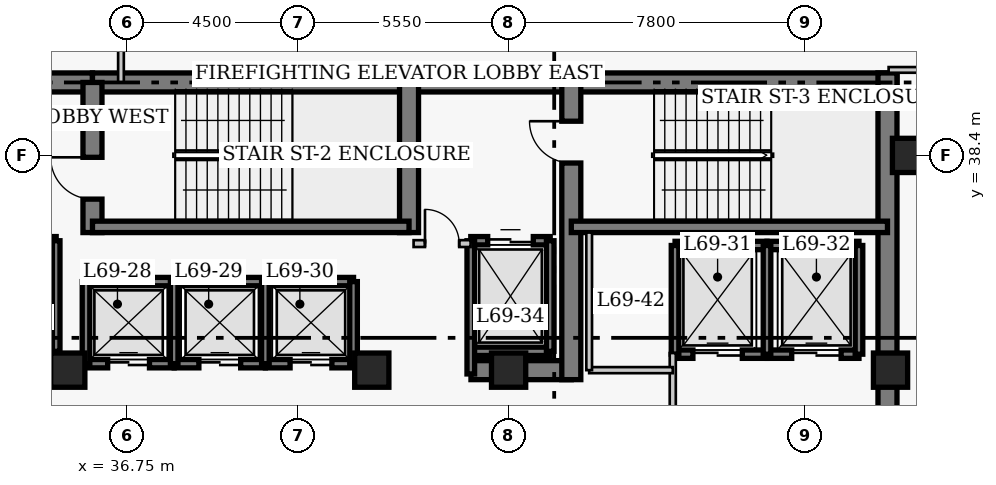
"""IFC4 building model, lengths in metres.
Left out: names, types, materials, properties, quantities, classifications, styles, units other than length and angle.
Written with IfcOpenShell. Run it as: python <this file> out.ifc"""

import sys

from ifc_helpers import new_model, si_unit, direction, frame, frame_2d, origin, origin_2d, place, context, subcontext, project, spatial, rectangle, extrude, element, fill, save


model = new_model("IFC4")
c1 = context("Model", 3, precision=1e-05, world=origin(), true_north=direction((0.0, 1.0)))
c2 = subcontext(c1, "Body", "Model", "MODEL_VIEW")
j1 = project(units=[si_unit("LENGTHUNIT", "METRE"), si_unit("PLANEANGLEUNIT", "RADIAN")], contexts=[c1])
p1 = place(None, origin())
s1 = spatial("IfcSite", under=j1, at=p1, CompositionType="ELEMENT")
p2 = place(p1, origin())
s2 = spatial("IfcBuilding", under=s1, at=p2, CompositionType="ELEMENT")
p3 = place(p2, frame((0.0, 0.0, 277.4)))
s3 = spatial("IfcBuildingStorey", under=s2, at=p3, CompositionType="ELEMENT", Elevation=277.4)
p4 = place(p3, frame((21.65, 40.32, 0.0), z_axis=(0.0, 0.0, 1.0), x_axis=(1.0, 0.0, 0.0)))
e1 = element("IfcWall", 1, at=p4, inside=s3, PredefinedType="SHEAR", context=c2, shape_type="SweptSolid", body=[
    extrude(rectangle(XDim=14.2, YDim=0.5, at=frame_2d((7.1, 0.0))), origin(), (0.0, 0.0, 1.0), 4.0),
])
p5 = place(p3, frame((35.85, 40.32, 0.0), z_axis=(0.0, 0.0, 1.0), x_axis=(1.0, 0.0, 0.0)))
e2 = element("IfcWall", 2, at=p5, inside=s3, PredefinedType="SHEAR", context=c2, shape_type="SweptSolid", body=[
    extrude(rectangle(XDim=12.6, YDim=0.5, at=frame_2d((6.3, 0.0))), origin(), (0.0, 0.0, 1.0), 4.0),
])
p6 = place(p3, frame((48.45, 40.32, 0.0), z_axis=(0.0, 0.0, 1.0), x_axis=(1.0, 0.0, 0.0)))
e3 = element("IfcWall", 3, at=p6, inside=s3, PredefinedType="SHEAR", context=c2, shape_type="SweptSolid", body=[
    extrude(rectangle(XDim=8.57, YDim=0.5, at=frame_2d((4.285, 0.0))), origin(), (0.0, 0.0, 1.0), 4.0),
])
p7 = place(p3, frame((56.77, 27.05, 0.0), z_axis=(0.0, 0.0, 1.0), x_axis=(0.0, 1.0, 0.0)))
e4 = element("IfcWall", 4, at=p7, inside=s3, PredefinedType="SHEAR", context=c2, shape_type="SweptSolid", body=[
    extrude(rectangle(XDim=13.52, YDim=0.5, at=frame_2d((6.76, 0.0))), origin(), (0.0, 0.0, 1.0), 4.0),
])
p8 = place(p3, frame((45.81, 32.75, 0.0), z_axis=(0.0, 0.0, 1.0), x_axis=(1.0, 0.0, 0.0)))
e5 = element("IfcWall", 5, at=p8, inside=s3, PredefinedType="SHEAR", context=c2, shape_type="SweptSolid", body=[
    extrude(rectangle(XDim=2.64, YDim=0.5, at=frame_2d((1.32, 0.0))), origin(), (0.0, 0.0, 1.0), 4.0),
])
p9 = place(p3, frame((35.85, 36.37, 0.0), z_axis=(0.0, 0.0, 1.0), x_axis=(0.0, 1.0, 0.0)))
e6 = element("IfcWall", 6, at=p9, inside=s3, PredefinedType="SHEAR", context=c2, shape_type="SweptSolid", body=[
    extrude(rectangle(XDim=3.95, YDim=0.5, at=frame_2d((1.975, 0.0))), origin(), (0.0, 0.0, 1.0), 4.0),
])
p10 = place(p9, frame((0.88, 0.0, 0.0)))
e7 = element("IfcOpeningElement", 7, at=p10, cuts=e6, PredefinedType="OPENING", context=c2, shape_type="SweptSolid", body=[
    extrude(rectangle(XDim=1.1, YDim=2.15, at=frame_2d((0.55, 1.075))), frame((0.0, 0.26, 0.0), z_axis=(0.0, -1.0, 0.0), x_axis=(1.0, 0.0, 0.0)), (0.0, 0.0, 1.0), 0.52),
])
p11 = place(p3, frame((44.18, 36.37, 0.0), z_axis=(0.0, 0.0, 1.0), x_axis=(0.0, 1.0, 0.0)))
e8 = element("IfcWall", 8, at=p11, inside=s3, PredefinedType="SHEAR", context=c2, shape_type="SweptSolid", body=[
    extrude(rectangle(XDim=3.95, YDim=0.5, at=frame_2d((1.975, 0.0))), origin(), (0.0, 0.0, 1.0), 4.0),
])
p12 = place(p3, frame((48.45, 32.5, 0.0), z_axis=(0.0, 0.0, 1.0), x_axis=(0.0, 1.0, 0.0)))
e9 = element("IfcWall", 9, at=p12, inside=s3, PredefinedType="SHEAR", context=c2, shape_type="SweptSolid", body=[
    extrude(rectangle(XDim=7.82, YDim=0.5, at=frame_2d((3.91, 0.0))), origin(), (0.0, 0.0, 1.0), 4.0),
])
p13 = place(p12, frame((5.7, 0.0, 0.0)))
e10 = element("IfcOpeningElement", 10, at=p13, cuts=e9, PredefinedType="OPENING", context=c2, shape_type="SweptSolid", body=[
    extrude(rectangle(XDim=1.1, YDim=2.15, at=frame_2d((0.55, 1.075))), frame((0.0, 0.26, 0.0), z_axis=(0.0, -1.0, 0.0), x_axis=(1.0, 0.0, 0.0)), (0.0, 0.0, 1.0), 0.52),
])
p14 = place(p3, frame((35.85, 36.52, 0.0), z_axis=(0.0, 0.0, 1.0), x_axis=(1.0, 0.0, 0.0)))
e11 = element("IfcWall", 11, at=p14, inside=s3, PredefinedType="SHEAR", context=c2, shape_type="SweptSolid", body=[
    extrude(rectangle(XDim=8.33, YDim=0.3, at=frame_2d((4.165, 0.0))), origin(), (0.0, 0.0, 1.0), 4.0),
])
p15 = place(p3, frame((48.45, 36.52, 0.0), z_axis=(0.0, 0.0, 1.0), x_axis=(1.0, 0.0, 0.0)))
e12 = element("IfcWall", 12, at=p15, inside=s3, PredefinedType="SHEAR", context=c2, shape_type="SweptSolid", body=[
    extrude(rectangle(XDim=8.32, YDim=0.3, at=frame_2d((4.16, 0.0))), origin(), (0.0, 0.0, 1.0), 4.0),
])
for number, where, z_axis, x_axis in (
    (13, (57.35, 38.4, 0.0), (0.0, 0.0, 1.0), (1.0, 0.0, 0.0)),
    (14, (35.2, 32.75, 0.0), (0.0, 0.0, 1.0), (1.0, 0.0, 0.0)),
    (15, (43.2, 32.75, 0.0), (0.0, 0.0, 1.0), (1.0, 0.0, 0.0)),
    (16, (46.8, 32.75, 0.0), (0.0, 0.0, 1.0), (1.0, 0.0, 0.0)),
    (17, (56.85, 32.75, 0.0), (0.0, 0.0, 1.0), (1.0, 0.0, 0.0)),
):
    element("IfcColumn", number, at=place(p3, frame(where, z_axis=z_axis, x_axis=x_axis)), inside=s3, PredefinedType="COLUMN", context=c2, shape_type="SweptSolid", body=[
        extrude(rectangle(XDim=0.9, YDim=0.9, at=origin_2d()), origin(), (0.0, 0.0, 1.0), 4.0),
    ])
p16 = place(p3, frame((35.68, 35.08, 0.0), z_axis=(0.0, 0.0, 1.0), x_axis=(1.0, 0.0, 0.0)))
e18 = element("IfcWall", 18, at=p16, inside=s3, PredefinedType="SHEAR", context=c2, shape_type="SweptSolid", body=[
    extrude(rectangle(XDim=2.32, YDim=0.22, at=frame_2d((1.16, 0.0))), origin(), (0.0, 0.0, 1.0), 4.0),
])
p17 = place(p3, frame((35.68, 32.92, 0.0), z_axis=(0.0, 0.0, 1.0), x_axis=(1.0, 0.0, 0.0)))
e19 = element("IfcWall", 19, at=p17, inside=s3, PredefinedType="SHEAR", context=c2, shape_type="SweptSolid", body=[
    extrude(rectangle(XDim=2.32, YDim=0.22, at=frame_2d((1.16, 0.0))), origin(), (0.0, 0.0, 1.0), 4.0),
])
p18 = place(p17, frame((0.57, 0.0, 0.0)))
e20 = element("IfcOpeningElement", 20, at=p18, cuts=e19, PredefinedType="OPENING", context=c2, shape_type="SweptSolid", body=[
    extrude(rectangle(XDim=1.1, YDim=2.15, at=frame_2d((0.55, 1.075))), frame((0.0, 0.12, 0.0), z_axis=(0.0, -1.0, 0.0), x_axis=(1.0, 0.0, 0.0)), (0.0, 0.0, 1.0), 0.24),
])
p19 = place(p3, frame((35.68, 32.92, 0.0), z_axis=(0.0, 0.0, 1.0), x_axis=(0.0, 1.0, 0.0)))
e21 = element("IfcWall", 21, at=p19, inside=s3, PredefinedType="SHEAR", context=c2, shape_type="SweptSolid", body=[
    extrude(rectangle(XDim=2.16, YDim=0.2, at=frame_2d((1.08, 0.0))), origin(), (0.0, 0.0, 1.0), 4.0),
])
p20 = place(p3, frame((38.0, 35.08, 0.0), z_axis=(0.0, 0.0, 1.0), x_axis=(1.0, 0.0, 0.0)))
e22 = element("IfcWall", 22, at=p20, inside=s3, PredefinedType="SHEAR", context=c2, shape_type="SweptSolid", body=[
    extrude(rectangle(XDim=2.4, YDim=0.22, at=frame_2d((1.2, 0.0))), origin(), (0.0, 0.0, 1.0), 4.0),
])
p21 = place(p3, frame((38.0, 32.92, 0.0), z_axis=(0.0, 0.0, 1.0), x_axis=(1.0, 0.0, 0.0)))
e23 = element("IfcWall", 23, at=p21, inside=s3, PredefinedType="SHEAR", context=c2, shape_type="SweptSolid", body=[
    extrude(rectangle(XDim=2.4, YDim=0.22, at=frame_2d((1.2, 0.0))), origin(), (0.0, 0.0, 1.0), 4.0),
])
p22 = place(p21, frame((0.65, 0.0, 0.0)))
e24 = element("IfcOpeningElement", 24, at=p22, cuts=e23, PredefinedType="OPENING", context=c2, shape_type="SweptSolid", body=[
    extrude(rectangle(XDim=1.1, YDim=2.15, at=frame_2d((0.55, 1.075))), frame((0.0, 0.12, 0.0), z_axis=(0.0, -1.0, 0.0), x_axis=(1.0, 0.0, 0.0)), (0.0, 0.0, 1.0), 0.24),
])
p23 = place(p3, frame((38.0, 32.92, 0.0), z_axis=(0.0, 0.0, 1.0), x_axis=(0.0, 1.0, 0.0)))
e25 = element("IfcWall", 25, at=p23, inside=s3, PredefinedType="SHEAR", context=c2, shape_type="SweptSolid", body=[
    extrude(rectangle(XDim=2.16, YDim=0.2, at=frame_2d((1.08, 0.0))), origin(), (0.0, 0.0, 1.0), 4.0),
])
p24 = place(p3, frame((40.4, 35.08, 0.0), z_axis=(0.0, 0.0, 1.0), x_axis=(1.0, 0.0, 0.0)))
e26 = element("IfcWall", 26, at=p24, inside=s3, PredefinedType="SHEAR", context=c2, shape_type="SweptSolid", body=[
    extrude(rectangle(XDim=2.32, YDim=0.22, at=frame_2d((1.16, 0.0))), origin(), (0.0, 0.0, 1.0), 4.0),
])
p25 = place(p3, frame((40.4, 32.92, 0.0), z_axis=(0.0, 0.0, 1.0), x_axis=(1.0, 0.0, 0.0)))
e27 = element("IfcWall", 27, at=p25, inside=s3, PredefinedType="SHEAR", context=c2, shape_type="SweptSolid", body=[
    extrude(rectangle(XDim=2.32, YDim=0.22, at=frame_2d((1.16, 0.0))), origin(), (0.0, 0.0, 1.0), 4.0),
])
p26 = place(p25, frame((0.65, 0.0, 0.0)))
e28 = element("IfcOpeningElement", 28, at=p26, cuts=e27, PredefinedType="OPENING", context=c2, shape_type="SweptSolid", body=[
    extrude(rectangle(XDim=1.1, YDim=2.15, at=frame_2d((0.55, 1.075))), frame((0.0, 0.12, 0.0), z_axis=(0.0, -1.0, 0.0), x_axis=(1.0, 0.0, 0.0)), (0.0, 0.0, 1.0), 0.24),
])
for number, where, z_axis, x_axis in (
    (29, (40.4, 32.92, 0.0), (0.0, 0.0, 1.0), (0.0, 1.0, 0.0)),
    (30, (42.72, 32.92, 0.0), (0.0, 0.0, 1.0), (0.0, 1.0, 0.0)),
):
    element("IfcWall", number, at=place(p3, frame(where, z_axis=z_axis, x_axis=x_axis)), inside=s3, PredefinedType="SHEAR", context=c2, shape_type="SweptSolid", body=[
        extrude(rectangle(XDim=2.16, YDim=0.2, at=frame_2d((1.08, 0.0))), origin(), (0.0, 0.0, 1.0), 4.0),
    ])
p27 = place(p3, frame((51.18, 36.03, 0.0), z_axis=(0.0, 0.0, 1.0), x_axis=(1.0, 0.0, 0.0)))
e31 = element("IfcWall", 31, at=p27, inside=s3, PredefinedType="SHEAR", context=c2, shape_type="SweptSolid", body=[
    extrude(rectangle(XDim=2.42, YDim=0.22, at=frame_2d((1.21, 0.0))), origin(), (0.0, 0.0, 1.0), 4.0),
])
p28 = place(p3, frame((51.18, 33.17, 0.0), z_axis=(0.0, 0.0, 1.0), x_axis=(1.0, 0.0, 0.0)))
e32 = element("IfcWall", 32, at=p28, inside=s3, PredefinedType="SHEAR", context=c2, shape_type="SweptSolid", body=[
    extrude(rectangle(XDim=2.42, YDim=0.22, at=frame_2d((1.21, 0.0))), origin(), (0.0, 0.0, 1.0), 4.0),
])
p29 = place(p28, frame((0.47, 0.0, 0.0)))
e33 = element("IfcOpeningElement", 33, at=p29, cuts=e32, PredefinedType="OPENING", context=c2, shape_type="SweptSolid", body=[
    extrude(rectangle(XDim=1.3, YDim=2.15, at=frame_2d((0.65, 1.075))), frame((0.0, 0.12, 0.0), z_axis=(0.0, -1.0, 0.0), x_axis=(1.0, 0.0, 0.0)), (0.0, 0.0, 1.0), 0.24),
])
p30 = place(p3, frame((51.18, 33.17, 0.0), z_axis=(0.0, 0.0, 1.0), x_axis=(0.0, 1.0, 0.0)))
e34 = element("IfcWall", 34, at=p30, inside=s3, PredefinedType="SHEAR", context=c2, shape_type="SweptSolid", body=[
    extrude(rectangle(XDim=2.86, YDim=0.2, at=frame_2d((1.43, 0.0))), origin(), (0.0, 0.0, 1.0), 4.0),
])
p31 = place(p3, frame((53.6, 36.03, 0.0), z_axis=(0.0, 0.0, 1.0), x_axis=(1.0, 0.0, 0.0)))
e35 = element("IfcWall", 35, at=p31, inside=s3, PredefinedType="SHEAR", context=c2, shape_type="SweptSolid", body=[
    extrude(rectangle(XDim=2.42, YDim=0.22, at=frame_2d((1.21, 0.0))), origin(), (0.0, 0.0, 1.0), 4.0),
])
p32 = place(p3, frame((53.6, 33.17, 0.0), z_axis=(0.0, 0.0, 1.0), x_axis=(1.0, 0.0, 0.0)))
e36 = element("IfcWall", 36, at=p32, inside=s3, PredefinedType="SHEAR", context=c2, shape_type="SweptSolid", body=[
    extrude(rectangle(XDim=2.42, YDim=0.22, at=frame_2d((1.21, 0.0))), origin(), (0.0, 0.0, 1.0), 4.0),
])
p33 = place(p32, frame((0.65, 0.0, 0.0)))
e37 = element("IfcOpeningElement", 37, at=p33, cuts=e36, PredefinedType="OPENING", context=c2, shape_type="SweptSolid", body=[
    extrude(rectangle(XDim=1.3, YDim=2.15, at=frame_2d((0.65, 1.075))), frame((0.0, 0.12, 0.0), z_axis=(0.0, -1.0, 0.0), x_axis=(1.0, 0.0, 0.0)), (0.0, 0.0, 1.0), 0.24),
])
for number, where, z_axis, x_axis in (
    (38, (53.6, 33.17, 0.0), (0.0, 0.0, 1.0), (0.0, 1.0, 0.0)),
    (39, (56.02, 33.17, 0.0), (0.0, 0.0, 1.0), (0.0, 1.0, 0.0)),
):
    element("IfcWall", number, at=place(p3, frame(where, z_axis=z_axis, x_axis=x_axis)), inside=s3, PredefinedType="SHEAR", context=c2, shape_type="SweptSolid", body=[
        extrude(rectangle(XDim=2.86, YDim=0.2, at=frame_2d((1.43, 0.0))), origin(), (0.0, 0.0, 1.0), 4.0),
    ])
p34 = place(p3, frame((32.805, 36.155, 0.0), z_axis=(0.0, 0.0, 1.0), x_axis=(1.0, 0.0, 0.0)))
e40 = element("IfcWall", 40, at=p34, inside=s3, PredefinedType="SHEAR", context=c2, shape_type="SweptSolid", body=[
    extrude(rectangle(XDim=2.09, YDim=0.22, at=frame_2d((1.045, 0.0))), origin(), (0.0, 0.0, 1.0), 4.0),
])
p35 = place(p34, frame((0.445, 0.0, 0.0)))
e41 = element("IfcOpeningElement", 41, at=p35, cuts=e40, PredefinedType="OPENING", context=c2, shape_type="SweptSolid", body=[
    extrude(rectangle(XDim=1.2, YDim=2.15, at=frame_2d((0.6, 1.075))), frame((0.0, 0.12, 0.0), z_axis=(0.0, -1.0, 0.0), x_axis=(1.0, 0.0, 0.0)), (0.0, 0.0, 1.0), 0.24),
])
p36 = place(p3, frame((32.805, 33.245, 0.0), z_axis=(0.0, 0.0, 1.0), x_axis=(1.0, 0.0, 0.0)))
e42 = element("IfcWall", 42, at=p36, inside=s3, PredefinedType="SHEAR", context=c2, shape_type="SweptSolid", body=[
    extrude(rectangle(XDim=2.09, YDim=0.22, at=frame_2d((1.045, 0.0))), origin(), (0.0, 0.0, 1.0), 4.0),
])
p37 = place(p3, frame((34.895, 33.245, 0.0), z_axis=(0.0, 0.0, 1.0), x_axis=(0.0, 1.0, 0.0)))
e43 = element("IfcWall", 43, at=p37, inside=s3, PredefinedType="SHEAR", context=c2, shape_type="SweptSolid", body=[
    extrude(rectangle(XDim=2.91, YDim=0.2, at=frame_2d((1.455, 0.0))), origin(), (0.0, 0.0, 1.0), 4.0),
])
p38 = place(p3, frame((45.805, 36.155, 0.0), z_axis=(0.0, 0.0, 1.0), x_axis=(1.0, 0.0, 0.0)))
e44 = element("IfcWall", 44, at=p38, inside=s3, PredefinedType="SHEAR", context=c2, shape_type="SweptSolid", body=[
    extrude(rectangle(XDim=2.09, YDim=0.22, at=frame_2d((1.045, 0.0))), origin(), (0.0, 0.0, 1.0), 4.0),
])
p39 = place(p38, frame((0.445, 0.0, 0.0)))
e45 = element("IfcOpeningElement", 45, at=p39, cuts=e44, PredefinedType="OPENING", context=c2, shape_type="SweptSolid", body=[
    extrude(rectangle(XDim=1.2, YDim=2.15, at=frame_2d((0.6, 1.075))), frame((0.0, 0.12, 0.0), z_axis=(0.0, -1.0, 0.0), x_axis=(1.0, 0.0, 0.0)), (0.0, 0.0, 1.0), 0.24),
])
p40 = place(p3, frame((45.805, 33.245, 0.0), z_axis=(0.0, 0.0, 1.0), x_axis=(1.0, 0.0, 0.0)))
e46 = element("IfcWall", 46, at=p40, inside=s3, PredefinedType="SHEAR", context=c2, shape_type="SweptSolid", body=[
    extrude(rectangle(XDim=2.09, YDim=0.22, at=frame_2d((1.045, 0.0))), origin(), (0.0, 0.0, 1.0), 4.0),
])
p41 = place(p3, frame((45.805, 32.65, 0.0), z_axis=(0.0, 0.0, 1.0), x_axis=(0.0, 1.0, 0.0)))
e47 = element("IfcWall", 47, at=p41, inside=s3, PredefinedType="SHEAR", context=c2, shape_type="SweptSolid", body=[
    extrude(rectangle(XDim=3.505, YDim=0.2, at=frame_2d((1.752, 0.0))), origin(), (0.0, 0.0, 1.0), 4.0),
])
p42 = place(p3, frame((47.895, 33.245, 0.0), z_axis=(0.0, 0.0, 1.0), x_axis=(0.0, 1.0, 0.0)))
e48 = element("IfcWall", 48, at=p42, inside=s3, PredefinedType="SHEAR", context=c2, shape_type="SweptSolid", body=[
    extrude(rectangle(XDim=2.91, YDim=0.2, at=frame_2d((1.455, 0.0))), origin(), (0.0, 0.0, 1.0), 4.0),
])
p43 = place(p3, frame((44.3, 36.08, 0.0), z_axis=(0.0, 0.0, 1.0), x_axis=(1.0, 0.0, 0.0)))
e49 = element("IfcWall", 49, at=p43, inside=s3, PredefinedType="PARTITIONING", context=c2, shape_type="SweptSolid", body=[
    extrude(rectangle(XDim=1.5, YDim=0.18, at=frame_2d((0.75, 0.0))), origin(), (0.0, 0.0, 1.0), 3.76),
])
p44 = place(p43, frame((0.3, 0.0, 0.0)))
e50 = element("IfcOpeningElement", 50, at=p44, cuts=e49, PredefinedType="OPENING", context=c2, shape_type="SweptSolid", body=[
    extrude(rectangle(XDim=0.9, YDim=2.15, at=frame_2d((0.45, 1.075))), frame((0.0, 0.1, 0.0), z_axis=(0.0, -1.0, 0.0), x_axis=(1.0, 0.0, 0.0)), (0.0, 0.0, 1.0), 0.2),
])
p45 = place(p3, frame((51.12, 29.5, 0.0), z_axis=(0.0, 0.0, 1.0), x_axis=(0.0, 1.0, 0.0)))
e51 = element("IfcWall", 51, at=p45, inside=s3, PredefinedType="PARTITIONING", context=c2, shape_type="SweptSolid", body=[
    extrude(rectangle(XDim=3.7, YDim=0.16, at=frame_2d((1.85, 0.0))), origin(), (0.0, 0.0, 1.0), 3.76),
])
p46 = place(p45, frame((0.9, 0.0, 0.0)))
e52 = element("IfcOpeningElement", 52, at=p46, cuts=e51, PredefinedType="OPENING", context=c2, shape_type="SweptSolid", body=[
    extrude(rectangle(XDim=1.1, YDim=2.15, at=frame_2d((0.55, 1.075))), frame((0.0, 0.09, 0.0), z_axis=(0.0, -1.0, 0.0), x_axis=(1.0, 0.0, 0.0)), (0.0, 0.0, 1.0), 0.18),
])
p47 = place(p3, frame((48.92, 32.75, 0.0), z_axis=(0.0, 0.0, 1.0), x_axis=(1.0, 0.0, 0.0)))
e53 = element("IfcWall", 53, at=p47, inside=s3, PredefinedType="PARTITIONING", context=c2, shape_type="SweptSolid", body=[
    extrude(rectangle(XDim=2.2, YDim=0.16, at=frame_2d((1.1, 0.0))), origin(), (0.0, 0.0, 1.0), 3.76),
])
p48 = place(p3, frame((48.92, 32.75, 0.0), z_axis=(0.0, 0.0, 1.0), x_axis=(0.0, 1.0, 0.0)))
e54 = element("IfcWall", 54, at=p48, inside=s3, PredefinedType="PARTITIONING", context=c2, shape_type="SweptSolid", body=[
    extrude(rectangle(XDim=3.62, YDim=0.15, at=frame_2d((1.81, 0.0))), origin(), (0.0, 0.0, 1.0), 3.76),
])
p49 = place(p3, frame((56.8, 40.65, 0.0), z_axis=(0.0, 0.0, 1.0), x_axis=(1.0, 0.0, 0.0)))
e55 = element("IfcWall", 55, at=p49, inside=s3, PredefinedType="PARTITIONING", context=c2, shape_type="SweptSolid", body=[
    extrude(rectangle(XDim=4.21, YDim=0.15, at=frame_2d((2.105, 0.0))), origin(), (0.0, 0.0, 1.0), 3.76),
])
p50 = place(p49, frame((2.6, 0.0, 0.0)))
e56 = element("IfcOpeningElement", 56, at=p50, cuts=e55, PredefinedType="OPENING", context=c2, shape_type="SweptSolid", body=[
    extrude(rectangle(XDim=1.0, YDim=2.15, at=frame_2d((0.5, 1.075))), frame((0.0, 0.085, 0.0), z_axis=(0.0, -1.0, 0.0), x_axis=(1.0, 0.0, 0.0)), (0.0, 0.0, 1.0), 0.17),
])
p51 = place(p3, frame((36.6, 40.32, 0.0), z_axis=(0.0, 0.0, 1.0), x_axis=(0.0, 1.0, 0.0)))
e57 = element("IfcWall", 57, at=p51, inside=s3, PredefinedType="PARTITIONING", context=c2, shape_type="SweptSolid", body=[
    extrude(rectangle(XDim=3.545, YDim=0.15, at=frame_2d((1.772, 0.0))), origin(), (0.0, 0.0, 1.0), 3.76),
])
p52 = place(p18, origin())
e58 = element("IfcDoor", 58, at=p52, inside=s3, OperationType="DOUBLE_DOOR_SLIDING", PredefinedType="DOOR", context=c2, shape_type="SweptSolid", body=[
    extrude(rectangle(XDim=1.1, YDim=2.15, at=frame_2d((0.55, 1.075))), frame((0.0, 0.025, 0.0), z_axis=(0.0, -1.0, 0.0), x_axis=(1.0, 0.0, 0.0)), (0.0, 0.0, 1.0), 0.05),
])
fill(e20, e58)
p53 = place(p22, origin())
e59 = element("IfcDoor", 59, at=p53, inside=s3, OperationType="DOUBLE_DOOR_SLIDING", PredefinedType="DOOR", context=c2, shape_type="SweptSolid", body=[
    extrude(rectangle(XDim=1.1, YDim=2.15, at=frame_2d((0.55, 1.075))), frame((0.0, 0.025, 0.0), z_axis=(0.0, -1.0, 0.0), x_axis=(1.0, 0.0, 0.0)), (0.0, 0.0, 1.0), 0.05),
])
fill(e24, e59)
p54 = place(p26, origin())
e60 = element("IfcDoor", 60, at=p54, inside=s3, OperationType="DOUBLE_DOOR_SLIDING", PredefinedType="DOOR", context=c2, shape_type="SweptSolid", body=[
    extrude(rectangle(XDim=1.1, YDim=2.15, at=frame_2d((0.55, 1.075))), frame((0.0, 0.025, 0.0), z_axis=(0.0, -1.0, 0.0), x_axis=(1.0, 0.0, 0.0)), (0.0, 0.0, 1.0), 0.05),
])
fill(e28, e60)
p55 = place(p29, origin())
e61 = element("IfcDoor", 61, at=p55, inside=s3, OperationType="DOUBLE_DOOR_SLIDING", PredefinedType="DOOR", context=c2, shape_type="SweptSolid", body=[
    extrude(rectangle(XDim=1.3, YDim=2.15, at=frame_2d((0.65, 1.075))), frame((0.0, 0.025, 0.0), z_axis=(0.0, -1.0, 0.0), x_axis=(1.0, 0.0, 0.0)), (0.0, 0.0, 1.0), 0.05),
])
fill(e33, e61)
p56 = place(p33, origin())
e62 = element("IfcDoor", 62, at=p56, inside=s3, OperationType="DOUBLE_DOOR_SLIDING", PredefinedType="DOOR", context=c2, shape_type="SweptSolid", body=[
    extrude(rectangle(XDim=1.3, YDim=2.15, at=frame_2d((0.65, 1.075))), frame((0.0, 0.025, 0.0), z_axis=(0.0, -1.0, 0.0), x_axis=(1.0, 0.0, 0.0)), (0.0, 0.0, 1.0), 0.05),
])
fill(e37, e62)
p57 = place(p39, origin())
e63 = element("IfcDoor", 63, at=p57, inside=s3, OperationType="DOUBLE_DOOR_SLIDING", PredefinedType="DOOR", context=c2, shape_type="SweptSolid", body=[
    extrude(rectangle(XDim=1.2, YDim=2.15, at=frame_2d((0.6, 1.075))), frame((0.0, 0.025, 0.0), z_axis=(0.0, -1.0, 0.0), x_axis=(1.0, 0.0, 0.0)), (0.0, 0.0, 1.0), 0.05),
])
fill(e45, e63)
p58 = place(p44, origin())
e64 = element("IfcDoor", 64, at=p58, inside=s3, OperationType="SINGLE_SWING_LEFT", PredefinedType="DOOR", context=c2, shape_type="SweptSolid", body=[
    extrude(rectangle(XDim=0.9, YDim=2.15, at=frame_2d((0.45, 1.075))), frame((0.0, 0.025, 0.0), z_axis=(0.0, -1.0, 0.0), x_axis=(1.0, 0.0, 0.0)), (0.0, 0.0, 1.0), 0.05),
])
fill(e50, e64)
p59 = place(p10, origin())
e65 = element("IfcDoor", 65, at=p59, inside=s3, OperationType="SINGLE_SWING_RIGHT", PredefinedType="DOOR", context=c2, shape_type="SweptSolid", body=[
    extrude(rectangle(XDim=1.1, YDim=2.15, at=frame_2d((0.55, 1.075))), frame((0.0, 0.025, 0.0), z_axis=(0.0, -1.0, 0.0), x_axis=(1.0, 0.0, 0.0)), (0.0, 0.0, 1.0), 0.05),
])
fill(e7, e65)
p60 = place(p13, origin())
e66 = element("IfcDoor", 66, at=p60, inside=s3, OperationType="SINGLE_SWING_RIGHT", PredefinedType="DOOR", context=c2, shape_type="SweptSolid", body=[
    extrude(rectangle(XDim=1.1, YDim=2.15, at=frame_2d((0.55, 1.075))), frame((0.0, 0.025, 0.0), z_axis=(0.0, -1.0, 0.0), x_axis=(1.0, 0.0, 0.0)), (0.0, 0.0, 1.0), 0.05),
])
fill(e10, e66)
save(model, sys.argv[1])
